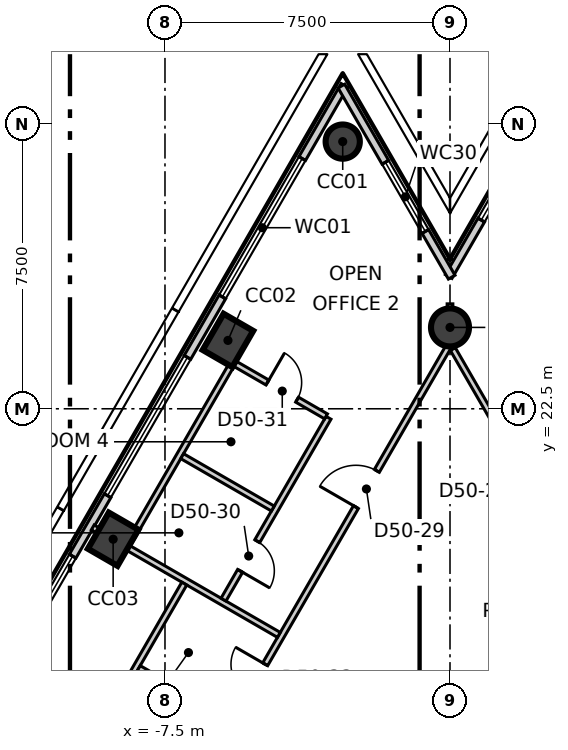
"""IFC4 building model, lengths in metres.
Left out: names, types, materials, properties, quantities, classifications, styles, units other than length and angle.
Written with IfcOpenShell. Run it as: python <this file> out.ifc"""

import sys

from ifc_helpers import new_model, si_unit, direction, frame, frame_2d, origin, origin_2d, place, context, subcontext, project, spatial, rectangle, circle, extrude, element, fill, save


model = new_model("IFC4")
c1 = context("Model", 3, precision=1e-05, world=origin(), true_north=direction((0.0, 1.0)))
c2 = subcontext(c1, "Body", "Model", "MODEL_VIEW")
j1 = project(units=[si_unit("LENGTHUNIT", "METRE"), si_unit("PLANEANGLEUNIT", "RADIAN")], contexts=[c1])
p1 = place(None, origin())
s1 = spatial("IfcSite", under=j1, at=p1, CompositionType="ELEMENT")
p2 = place(p1, origin())
s2 = spatial("IfcBuilding", under=s1, at=p2, CompositionType="ELEMENT")
p3 = place(p2, frame((0.0, 0.0, 215.3)))
s3 = spatial("IfcBuildingStorey", under=s2, at=p3, CompositionType="ELEMENT", Elevation=215.3)
p4 = place(p3, frame((-2.823, 29.53, -0.3), z_axis=(0.0, 0.0, 1.0), x_axis=(0.5, 0.866025403784, 0.0)))
e1 = element("IfcColumn", 1, at=p4, inside=s3, PredefinedType="COLUMN", context=c2, shape_type="SweptSolid", body=[
    extrude(circle(Radius=0.45, at=origin_2d()), origin(), (0.0, 0.0, 1.0), 4.0),
])
for number, where, z_axis, x_axis in (
    (2, (-5.843, 24.299, -0.3), (0.0, 0.0, 1.0), (0.5, 0.866, 0.0)),
    (3, (-8.864, 19.068, -0.3), (0.0, 0.0, 1.0), (0.5, 0.866, 0.0)),
):
    element("IfcColumn", number, at=place(p3, frame(where, z_axis=z_axis, x_axis=x_axis)), inside=s3, PredefinedType="COLUMN", context=c2, shape_type="SweptSolid", body=[
        extrude(rectangle(XDim=1.1, YDim=0.9, at=origin_2d()), origin(), (0.0, 0.0, 1.0), 4.0),
    ])
p5 = place(p3, frame((0.0, 24.641, -0.3), z_axis=(0.0, 0.0, 1.0), x_axis=(1.0, 0.0, 0.0)))
e4 = element("IfcColumn", 4, at=p5, inside=s3, PredefinedType="COLUMN", context=c2, shape_type="SweptSolid", body=[
    extrude(circle(Radius=0.5, at=origin_2d()), origin(), (0.0, 0.0, 1.0), 4.0),
])
p6 = place(p3, frame((-2.778, 31.008, 0.0), z_axis=(0.0, 0.0, 1.0), x_axis=(-0.499999612413, -0.866025627558, 0.0)))
e5 = element("IfcWall", 5, at=p6, inside=s3, PredefinedType="ELEMENTEDWALL", context=c2, shape_type="SweptSolid", body=[
    extrude(rectangle(XDim=50.91, YDim=0.2, at=frame_2d((25.455, 0.0))), origin(), (0.0, 0.0, 1.0), 3.7),
])
p7 = place(p6, frame((2.223, 0.0, 0.9)))
e6 = element("IfcOpeningElement", 6, at=p7, cuts=e5, PredefinedType="OPENING", context=c2, shape_type="SweptSolid", body=[
    extrude(rectangle(XDim=4.2, YDim=2.5, at=frame_2d((2.1, 1.25))), frame((0.0, 0.11, 0.0), z_axis=(0.0, -1.0, 0.0), x_axis=(1.0, 0.0, 0.0)), (0.0, 0.0, 1.0), 0.22),
])
p8 = place(p6, frame((8.263, 0.0, 0.9)))
e7 = element("IfcOpeningElement", 7, at=p8, cuts=e5, PredefinedType="OPENING", context=c2, shape_type="SweptSolid", body=[
    extrude(rectangle(XDim=4.2, YDim=2.5, at=frame_2d((2.1, 1.25))), frame((0.0, 0.11, 0.0), z_axis=(0.0, -1.0, 0.0), x_axis=(1.0, 0.0, 0.0)), (0.0, 0.0, 1.0), 0.22),
])
p9 = place(p6, frame((14.304, 0.0, 0.9)))
e8 = element("IfcOpeningElement", 8, at=p9, cuts=e5, PredefinedType="OPENING", context=c2, shape_type="SweptSolid", body=[
    extrude(rectangle(XDim=4.2, YDim=2.5, at=frame_2d((2.1, 1.25))), frame((0.0, 0.11, 0.0), z_axis=(0.0, -1.0, 0.0), x_axis=(1.0, 0.0, 0.0)), (0.0, 0.0, 1.0), 0.22),
])
p10 = place(p6, frame((20.344, 0.0, 0.9)))
e9 = element("IfcOpeningElement", 9, at=p10, cuts=e5, PredefinedType="OPENING", context=c2, shape_type="SweptSolid", body=[
    extrude(rectangle(XDim=4.2, YDim=2.5, at=frame_2d((2.1, 1.25))), frame((0.0, 0.11, 0.0), z_axis=(0.0, -1.0, 0.0), x_axis=(1.0, 0.0, 0.0)), (0.0, 0.0, 1.0), 0.22),
])
p11 = place(p6, frame((26.385, 0.0, 0.9)))
e10 = element("IfcOpeningElement", 10, at=p11, cuts=e5, PredefinedType="OPENING", context=c2, shape_type="SweptSolid", body=[
    extrude(rectangle(XDim=4.2, YDim=2.5, at=frame_2d((2.1, 1.25))), frame((0.0, 0.11, 0.0), z_axis=(0.0, -1.0, 0.0), x_axis=(1.0, 0.0, 0.0)), (0.0, 0.0, 1.0), 0.22),
])
p12 = place(p6, frame((32.425, 0.0, 0.9)))
e11 = element("IfcOpeningElement", 11, at=p12, cuts=e5, PredefinedType="OPENING", context=c2, shape_type="SweptSolid", body=[
    extrude(rectangle(XDim=4.2, YDim=2.5, at=frame_2d((2.1, 1.25))), frame((0.0, 0.11, 0.0), z_axis=(0.0, -1.0, 0.0), x_axis=(1.0, 0.0, 0.0)), (0.0, 0.0, 1.0), 0.22),
])
p13 = place(p6, frame((38.466, 0.0, 0.9)))
e12 = element("IfcOpeningElement", 12, at=p13, cuts=e5, PredefinedType="OPENING", context=c2, shape_type="SweptSolid", body=[
    extrude(rectangle(XDim=4.2, YDim=2.5, at=frame_2d((2.1, 1.25))), frame((0.0, 0.11, 0.0), z_axis=(0.0, -1.0, 0.0), x_axis=(1.0, 0.0, 0.0)), (0.0, 0.0, 1.0), 0.22),
])
p14 = place(p6, frame((44.506, 0.0, 0.9)))
e13 = element("IfcOpeningElement", 13, at=p14, cuts=e5, PredefinedType="OPENING", context=c2, shape_type="SweptSolid", body=[
    extrude(rectangle(XDim=4.2, YDim=2.5, at=frame_2d((2.1, 1.25))), frame((0.0, 0.11, 0.0), z_axis=(0.0, -1.0, 0.0), x_axis=(1.0, 0.0, 0.0)), (0.0, 0.0, 1.0), 0.22),
])
p15 = place(p3, frame((2.868, 31.008, 0.0), z_axis=(0.0, 0.0, 1.0), x_axis=(-0.499983322773, -0.866035032172, 0.0)))
e14 = element("IfcWall", 14, at=p15, inside=s3, PredefinedType="ELEMENTEDWALL", context=c2, shape_type="SweptSolid", body=[
    extrude(rectangle(XDim=5.806, YDim=0.2, at=frame_2d((2.903, 0.0))), origin(), (0.0, 0.0, 1.0), 3.7),
])
p16 = place(p15, frame((1.99, 0.0, 0.9)))
e15 = element("IfcOpeningElement", 15, at=p16, cuts=e14, PredefinedType="OPENING", context=c2, shape_type="SweptSolid", body=[
    extrude(rectangle(XDim=2.1, YDim=2.5, at=frame_2d((1.05, 1.25))), frame((0.0, 0.11, 0.0), z_axis=(0.0, -1.0, 0.0), x_axis=(1.0, 0.0, 0.0)), (0.0, 0.0, 1.0), 0.22),
])
p17 = place(p3, frame((0.045, 25.963, 0.0), z_axis=(0.0, 0.0, 1.0), x_axis=(-0.499983322773, 0.866035032172, 0.0)))
e16 = element("IfcWall", 16, at=p17, inside=s3, PredefinedType="ELEMENTEDWALL", context=c2, shape_type="SweptSolid", body=[
    extrude(rectangle(XDim=5.806, YDim=0.2, at=frame_2d((2.903, 0.0))), origin(), (0.0, 0.0, 1.0), 3.7),
])
p18 = place(p17, frame((1.39, 0.0, 0.9)))
e17 = element("IfcOpeningElement", 17, at=p18, cuts=e16, PredefinedType="OPENING", context=c2, shape_type="SweptSolid", body=[
    extrude(rectangle(XDim=2.1, YDim=2.5, at=frame_2d((1.05, 1.25))), frame((0.0, 0.11, 0.0), z_axis=(0.0, -1.0, 0.0), x_axis=(1.0, 0.0, 0.0)), (0.0, 0.0, 1.0), 0.22),
])
p19 = place(p3, frame((-20.883, -11.97, 0.0), z_axis=(0.0, 0.0, 1.0), x_axis=(0.500006150555, 0.866021852731, 0.0)))
e18 = element("IfcWall", 18, at=p19, inside=s3, PredefinedType="PARTITIONING", context=c2, shape_type="SweptSolid", body=[
    extrude(rectangle(XDim=41.766, YDim=0.15, at=frame_2d((20.883, 0.0))), origin(), (0.0, 0.0, 1.0), 3.7),
])
p20 = place(p19, frame((36.816, 0.0, 0.0)))
e19 = element("IfcOpeningElement", 19, at=p20, cuts=e18, PredefinedType="OPENING", context=c2, shape_type="SweptSolid", body=[
    extrude(rectangle(XDim=1.1, YDim=2.1, at=frame_2d((0.55, 1.05))), frame((0.0, 0.085, 0.0), z_axis=(0.0, -1.0, 0.0), x_axis=(1.0, 0.0, 0.0)), (0.0, 0.0, 1.0), 0.17),
])
p21 = place(p19, frame((23.939, 0.0, 0.0)))
e20 = element("IfcOpeningElement", 20, at=p21, cuts=e18, PredefinedType="OPENING", context=c2, shape_type="SweptSolid", body=[
    extrude(rectangle(XDim=1.1, YDim=2.1, at=frame_2d((0.55, 1.05))), frame((0.0, 0.085, 0.0), z_axis=(0.0, -1.0, 0.0), x_axis=(1.0, 0.0, 0.0)), (0.0, 0.0, 1.0), 0.17),
])
p22 = place(p19, frame((31.139, 0.0, 0.0)))
e21 = element("IfcOpeningElement", 21, at=p22, cuts=e18, PredefinedType="OPENING", context=c2, shape_type="SweptSolid", body=[
    extrude(rectangle(XDim=0.9, YDim=2.1, at=frame_2d((0.45, 1.05))), frame((0.0, 0.085, 0.0), z_axis=(0.0, -1.0, 0.0), x_axis=(1.0, 0.0, 0.0)), (0.0, 0.0, 1.0), 0.17),
])
p23 = place(p19, frame((28.739, 0.0, 0.0)))
e22 = element("IfcOpeningElement", 22, at=p23, cuts=e18, PredefinedType="OPENING", context=c2, shape_type="SweptSolid", body=[
    extrude(rectangle(XDim=0.9, YDim=2.1, at=frame_2d((0.45, 1.05))), frame((0.0, 0.085, 0.0), z_axis=(0.0, -1.0, 0.0), x_axis=(1.0, 0.0, 0.0)), (0.0, 0.0, 1.0), 0.17),
])
p24 = place(p19, frame((14.258, 0.0, 0.0)))
e23 = element("IfcOpeningElement", 23, at=p24, cuts=e18, PredefinedType="OPENING", context=c2, shape_type="SweptSolid", body=[
    extrude(rectangle(XDim=1.1, YDim=2.1, at=frame_2d((0.55, 1.05))), frame((0.0, 0.085, 0.0), z_axis=(0.0, -1.0, 0.0), x_axis=(1.0, 0.0, 0.0)), (0.0, 0.0, 1.0), 0.17),
])
p25 = place(p19, frame((3.777, 0.0, 0.0)))
e24 = element("IfcOpeningElement", 24, at=p25, cuts=e18, PredefinedType="OPENING", context=c2, shape_type="SweptSolid", body=[
    extrude(rectangle(XDim=1.1, YDim=2.1, at=frame_2d((0.55, 1.05))), frame((0.0, 0.085, 0.0), z_axis=(0.0, -1.0, 0.0), x_axis=(1.0, 0.0, 0.0)), (0.0, 0.0, 1.0), 0.17),
])
p26 = place(p3, frame((-9.401, 19.378, 0.0), z_axis=(0.0, 0.0, 1.0), x_axis=(0.866021685936, -0.500006439447, 0.0)))
e25 = element("IfcWall", 25, at=p26, inside=s3, PredefinedType="PARTITIONING", context=c2, shape_type="SweptSolid", body=[
    extrude(rectangle(XDim=5.656, YDim=0.15, at=frame_2d((2.828, 0.0))), origin(), (0.0, 0.0, 1.0), 3.7),
])
p27 = place(p3, frame((-9.354, 13.808, 0.0), z_axis=(0.0, 0.0, 1.0), x_axis=(0.499946109042, 0.866056515508, 0.0)))
e26 = element("IfcWall", 26, at=p27, inside=s3, PredefinedType="PARTITIONING", context=c2, shape_type="SweptSolid", body=[
    extrude(rectangle(XDim=4.725, YDim=0.15, at=frame_2d((2.362, 0.0))), origin(), (0.0, 0.0, 1.0), 3.7),
])
p28 = place(p3, frame((-8.189, 15.676, 0.0), z_axis=(0.0, 0.0, 1.0), x_axis=(0.866119184418, -0.499837531988, 0.0)))
e27 = element("IfcWall", 27, at=p28, inside=s3, PredefinedType="PARTITIONING", context=c2, shape_type="SweptSolid", body=[
    extrude(rectangle(XDim=2.755, YDim=0.15, at=frame_2d((1.377, 0.0))), origin(), (0.0, 0.0, 1.0), 3.7),
])
p29 = place(p3, frame((0.0, 24.35, 0.0), z_axis=(0.0, 0.0, 1.0), x_axis=(0.0, 1.0, 0.0)))
e28 = element("IfcWall", 28, at=p29, inside=s3, PredefinedType="PARTITIONING", context=c2, shape_type="SweptSolid", body=[
    extrude(rectangle(XDim=0.911, YDim=0.15, at=frame_2d((0.456, 0.0))), origin(), (0.0, 0.0, 1.0), 3.7),
])
p30 = place(p3, frame((0.075, 24.07, 0.0), z_axis=(0.0, 0.0, 1.0), x_axis=(0.500006834213, -0.866021458014, 0.0)))
e29 = element("IfcWall", 29, at=p30, inside=s3, PredefinedType="PARTITIONING", context=c2, shape_type="SweptSolid", body=[
    extrude(rectangle(XDim=41.616, YDim=0.15, at=frame_2d((20.808, 0.0))), origin(), (0.0, 0.0, 1.0), 3.7),
])
p31 = place(p30, frame((33.715, 0.0, 0.0)))
e30 = element("IfcOpeningElement", 30, at=p31, cuts=e29, PredefinedType="OPENING", context=c2, shape_type="SweptSolid", body=[
    extrude(rectangle(XDim=1.1, YDim=2.1, at=frame_2d((0.55, 1.05))), frame((0.0, 0.085, 0.0), z_axis=(0.0, -1.0, 0.0), x_axis=(1.0, 0.0, 0.0)), (0.0, 0.0, 1.0), 0.17),
])
p32 = place(p30, frame((22.098, 0.0, 0.0)))
e31 = element("IfcOpeningElement", 31, at=p32, cuts=e29, PredefinedType="OPENING", context=c2, shape_type="SweptSolid", body=[
    extrude(rectangle(XDim=1.0, YDim=2.1, at=frame_2d((0.5, 1.05))), frame((0.0, 0.085, 0.0), z_axis=(0.0, -1.0, 0.0), x_axis=(1.0, 0.0, 0.0)), (0.0, 0.0, 1.0), 0.17),
])
p33 = place(p30, frame((25.198, 0.0, 0.0)))
e32 = element("IfcOpeningElement", 32, at=p33, cuts=e29, PredefinedType="OPENING", context=c2, shape_type="SweptSolid", body=[
    extrude(rectangle(XDim=0.9, YDim=2.1, at=frame_2d((0.45, 1.05))), frame((0.0, 0.085, 0.0), z_axis=(0.0, -1.0, 0.0), x_axis=(1.0, 0.0, 0.0)), (0.0, 0.0, 1.0), 0.17),
])
p34 = place(p30, frame((9.858, 0.0, 0.0)))
e33 = element("IfcOpeningElement", 33, at=p34, cuts=e29, PredefinedType="OPENING", context=c2, shape_type="SweptSolid", body=[
    extrude(rectangle(XDim=1.1, YDim=2.1, at=frame_2d((0.55, 1.05))), frame((0.0, 0.085, 0.0), z_axis=(0.0, -1.0, 0.0), x_axis=(1.0, 0.0, 0.0)), (0.0, 0.0, 1.0), 0.17),
])
p35 = place(p30, frame((18.758, 0.0, 0.0)))
e34 = element("IfcOpeningElement", 34, at=p35, cuts=e29, PredefinedType="OPENING", context=c2, shape_type="SweptSolid", body=[
    extrude(rectangle(XDim=0.9, YDim=2.1, at=frame_2d((0.45, 1.05))), frame((0.0, 0.085, 0.0), z_axis=(0.0, -1.0, 0.0), x_axis=(1.0, 0.0, 0.0)), (0.0, 0.0, 1.0), 0.17),
])
p36 = place(p30, frame((15.558, 0.0, 0.0)))
e35 = element("IfcOpeningElement", 35, at=p36, cuts=e29, PredefinedType="OPENING", context=c2, shape_type="SweptSolid", body=[
    extrude(rectangle(XDim=0.9, YDim=2.1, at=frame_2d((0.45, 1.05))), frame((0.0, 0.085, 0.0), z_axis=(0.0, -1.0, 0.0), x_axis=(1.0, 0.0, 0.0)), (0.0, 0.0, 1.0), 0.17),
])
p37 = place(p30, frame((12.658, 0.0, 0.0)))
e36 = element("IfcOpeningElement", 36, at=p37, cuts=e29, PredefinedType="OPENING", context=c2, shape_type="SweptSolid", body=[
    extrude(rectangle(XDim=1.0, YDim=2.1, at=frame_2d((0.5, 1.05))), frame((0.0, 0.085, 0.0), z_axis=(0.0, -1.0, 0.0), x_axis=(1.0, 0.0, 0.0)), (0.0, 0.0, 1.0), 0.17),
])
p38 = place(p30, frame((3.776, 0.0, 0.0)))
e37 = element("IfcOpeningElement", 37, at=p38, cuts=e29, PredefinedType="OPENING", context=c2, shape_type="SweptSolid", body=[
    extrude(rectangle(XDim=1.1, YDim=2.1, at=frame_2d((0.55, 1.05))), frame((0.0, 0.085, 0.0), z_axis=(0.0, -1.0, 0.0), x_axis=(1.0, 0.0, 0.0)), (0.0, 0.0, 1.0), 0.17),
])
p39 = place(p3, frame((-8.475, 18.93, 0.0), z_axis=(0.0, 0.0, 1.0), x_axis=(0.499931554694, 0.866064917094, 0.0)))
e38 = element("IfcWall", 38, at=p39, inside=s3, PredefinedType="PARTITIONING", context=c2, shape_type="SweptSolid", body=[
    extrude(rectangle(XDim=5.525, YDim=0.15, at=frame_2d((2.763, 0.0))), origin(), (0.0, 0.0, 1.0), 2.95),
])
p40 = place(p3, frame((-5.96, 17.478, 0.0), z_axis=(0.0, 0.0, 1.0), x_axis=(0.500050108258, 0.865996471835, 0.0)))
e39 = element("IfcWall", 39, at=p40, inside=s3, PredefinedType="PARTITIONING", context=c2, shape_type="SweptSolid", body=[
    extrude(rectangle(XDim=5.525, YDim=0.15, at=frame_2d((2.763, 0.0))), origin(), (0.0, 0.0, 1.0), 3.7),
])
p41 = place(p40, frame((0.875, 0.0, 0.0)))
e40 = element("IfcOpeningElement", 40, at=p41, cuts=e39, PredefinedType="OPENING", context=c2, shape_type="SweptSolid", body=[
    extrude(rectangle(XDim=0.9, YDim=2.1, at=frame_2d((0.45, 1.05))), frame((0.0, 0.085, 0.0), z_axis=(0.0, -1.0, 0.0), x_axis=(1.0, 0.0, 0.0)), (0.0, 0.0, 1.0), 0.17),
])
p42 = place(p3, frame((-5.648, 23.678, 0.0), z_axis=(0.0, 0.0, 1.0), x_axis=(0.865965703354, -0.500103389924, 0.0)))
e41 = element("IfcWall", 41, at=p42, inside=s3, PredefinedType="PARTITIONING", context=c2, shape_type="SweptSolid", body=[
    extrude(rectangle(XDim=2.755, YDim=0.15, at=frame_2d((1.378, 0.0))), origin(), (0.0, 0.0, 1.0), 3.7),
])
p43 = place(p42, frame((0.975, 0.0, 0.0)))
e42 = element("IfcOpeningElement", 42, at=p43, cuts=e41, PredefinedType="OPENING", context=c2, shape_type="SweptSolid", body=[
    extrude(rectangle(XDim=0.9, YDim=2.1, at=frame_2d((0.45, 1.05))), frame((0.0, 0.085, 0.0), z_axis=(0.0, -1.0, 0.0), x_axis=(1.0, 0.0, 0.0)), (0.0, 0.0, 1.0), 0.17),
])
p44 = place(p3, frame((-7.048, 21.253, 0.0), z_axis=(0.0, 0.0, 1.0), x_axis=(0.865965703354, -0.500103389924, 0.0)))
e43 = element("IfcWall", 43, at=p44, inside=s3, PredefinedType="PARTITIONING", context=c2, shape_type="SweptSolid", body=[
    extrude(rectangle(XDim=2.755, YDim=0.15, at=frame_2d((1.378, 0.0))), origin(), (0.0, 0.0, 1.0), 3.7),
])
p45 = place(p7, origin())
e44 = element("IfcWindow", 44, at=p45, inside=s3, PartitioningType="SINGLE_PANEL", PredefinedType="WINDOW", context=c2, shape_type="SweptSolid", body=[
    extrude(rectangle(XDim=4.2, YDim=2.5, at=frame_2d((2.1, 1.25))), frame((0.0, 0.03, 0.0), z_axis=(0.0, -1.0, 0.0), x_axis=(1.0, 0.0, 0.0)), (0.0, 0.0, 1.0), 0.06),
])
fill(e6, e44)
p46 = place(p8, origin())
e45 = element("IfcWindow", 45, at=p46, inside=s3, PartitioningType="SINGLE_PANEL", PredefinedType="WINDOW", context=c2, shape_type="SweptSolid", body=[
    extrude(rectangle(XDim=4.2, YDim=2.5, at=frame_2d((2.1, 1.25))), frame((0.0, 0.03, 0.0), z_axis=(0.0, -1.0, 0.0), x_axis=(1.0, 0.0, 0.0)), (0.0, 0.0, 1.0), 0.06),
])
fill(e7, e45)
p47 = place(p9, origin())
e46 = element("IfcWindow", 46, at=p47, inside=s3, PartitioningType="SINGLE_PANEL", PredefinedType="WINDOW", context=c2, shape_type="SweptSolid", body=[
    extrude(rectangle(XDim=4.2, YDim=2.5, at=frame_2d((2.1, 1.25))), frame((0.0, 0.03, 0.0), z_axis=(0.0, -1.0, 0.0), x_axis=(1.0, 0.0, 0.0)), (0.0, 0.0, 1.0), 0.06),
])
fill(e8, e46)
p48 = place(p16, origin())
e47 = element("IfcWindow", 47, at=p48, inside=s3, PartitioningType="SINGLE_PANEL", PredefinedType="WINDOW", context=c2, shape_type="SweptSolid", body=[
    extrude(rectangle(XDim=2.1, YDim=2.5, at=frame_2d((1.05, 1.25))), frame((0.0, 0.03, 0.0), z_axis=(0.0, -1.0, 0.0), x_axis=(1.0, 0.0, 0.0)), (0.0, 0.0, 1.0), 0.06),
])
fill(e15, e47)
p49 = place(p18, origin())
e48 = element("IfcWindow", 48, at=p49, inside=s3, PartitioningType="SINGLE_PANEL", PredefinedType="WINDOW", context=c2, shape_type="SweptSolid", body=[
    extrude(rectangle(XDim=2.1, YDim=2.5, at=frame_2d((1.05, 1.25))), frame((0.0, 0.03, 0.0), z_axis=(0.0, -1.0, 0.0), x_axis=(1.0, 0.0, 0.0)), (0.0, 0.0, 1.0), 0.06),
])
fill(e17, e48)
p50 = place(p20, origin())
e49 = element("IfcDoor", 49, at=p50, inside=s3, OperationType="SINGLE_SWING_RIGHT", PredefinedType="DOOR", context=c2, shape_type="SweptSolid", body=[
    extrude(rectangle(XDim=1.1, YDim=2.1, at=frame_2d((0.55, 1.05))), frame((0.0, 0.025, 0.0), z_axis=(0.0, -1.0, 0.0), x_axis=(1.0, 0.0, 0.0)), (0.0, 0.0, 1.0), 0.05),
])
fill(e19, e49)
p51 = place(p41, origin())
e50 = element("IfcDoor", 50, at=p51, inside=s3, OperationType="SINGLE_SWING_LEFT", PredefinedType="DOOR", context=c2, shape_type="SweptSolid", body=[
    extrude(rectangle(XDim=0.9, YDim=2.1, at=frame_2d((0.45, 1.05))), frame((0.0, 0.025, 0.0), z_axis=(0.0, -1.0, 0.0), x_axis=(1.0, 0.0, 0.0)), (0.0, 0.0, 1.0), 0.05),
])
fill(e40, e50)
p52 = place(p43, origin())
e51 = element("IfcDoor", 51, at=p52, inside=s3, OperationType="SINGLE_SWING_RIGHT", PredefinedType="DOOR", context=c2, shape_type="SweptSolid", body=[
    extrude(rectangle(XDim=0.9, YDim=2.1, at=frame_2d((0.45, 1.05))), frame((0.0, 0.025, 0.0), z_axis=(0.0, -1.0, 0.0), x_axis=(1.0, 0.0, 0.0)), (0.0, 0.0, 1.0), 0.05),
])
fill(e42, e51)
p53 = place(p22, origin())
e52 = element("IfcDoor", 52, at=p53, inside=s3, OperationType="SINGLE_SWING_LEFT", PredefinedType="DOOR", context=c2, shape_type="SweptSolid", body=[
    extrude(rectangle(XDim=0.9, YDim=2.1, at=frame_2d((0.45, 1.05))), frame((0.0, 0.025, 0.0), z_axis=(0.0, -1.0, 0.0), x_axis=(1.0, 0.0, 0.0)), (0.0, 0.0, 1.0), 0.05),
])
fill(e21, e52)
save(model, sys.argv[1])
